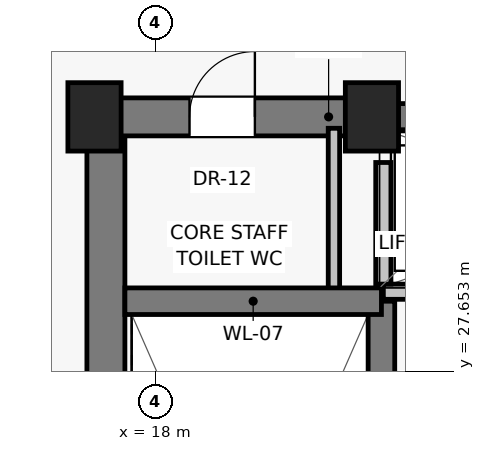
"""IFC4 building model, lengths in metres.
Left out: names, types, materials, properties, quantities, classifications, styles, units other than length and angle.
Written with IfcOpenShell. Run it as: python <this file> out.ifc"""

import sys

from ifc_helpers import new_model, si_unit, direction, frame, frame_2d, origin, origin_2d, place, context, subcontext, project, spatial, rectangle, extrude, source, transform, mapped, element, fill, save


model = new_model("IFC4")
c1 = context("Model", 3, precision=1e-05, world=origin(), true_north=direction((0.0, 1.0)))
c2 = subcontext(c1, "Body", "Model", "MODEL_VIEW")
j1 = project(units=[si_unit("LENGTHUNIT", "METRE"), si_unit("PLANEANGLEUNIT", "RADIAN")], contexts=[c1])
p1 = place(None, origin())
s1 = spatial("IfcSite", under=j1, at=p1, CompositionType="ELEMENT")
p2 = place(p1, origin())
s2 = spatial("IfcBuilding", under=s1, at=p2, CompositionType="ELEMENT")
p3 = place(p2, frame((0.0, 0.0, 182.1)))
s3 = spatial("IfcBuildingStorey", under=s2, at=p3, CompositionType="ELEMENT", Elevation=182.1)
for number, where, z_axis, x_axis in (
    (1, (17.2, 31.0, 0.0), (0.0, 0.0, 1.0), (1.0, 0.0, 0.0)),
    (2, (20.85, 31.0, 0.0), (0.0, 0.0, 1.0), (1.0, 0.0, 0.0)),
):
    element("IfcColumn", number, at=place(p3, frame(where, z_axis=z_axis, x_axis=x_axis)), inside=s3, PredefinedType="PILASTER", context=c2, shape_type="SweptSolid", body=[
        extrude(rectangle(XDim=0.7, YDim=0.9, at=origin_2d()), origin(), (0.0, 0.0, 1.0), 3.25),
    ])
p4 = place(p3, frame((17.35, 16.8, 0.0), z_axis=(0.0, 0.0, 1.0), x_axis=(0.0, 1.0, 0.0)))
e3 = element("IfcWall", 3, at=p4, inside=s3, PredefinedType="SHEAR", context=c2, shape_type="SweptSolid", body=[
    extrude(rectangle(XDim=14.2, YDim=0.5, at=frame_2d((7.1, 0.0))), origin(), (0.0, 0.0, 1.0), 3.015),
])
p5 = place(p3, frame((17.2, 31.0, 0.0), z_axis=(0.0, 0.0, 1.0), x_axis=(1.0, 0.0, 0.0)))
e4 = element("IfcWall", 4, at=p5, inside=s3, PredefinedType="SHEAR", context=c2, shape_type="SweptSolid", body=[
    extrude(rectangle(XDim=3.8, YDim=0.5, at=frame_2d((1.9, 0.0))), origin(), (0.0, 0.0, 1.0), 3.015),
])
p6 = place(p5, frame((1.25, 0.0, 0.0)))
e5 = element("IfcOpeningElement", 5, at=p6, cuts=e4, PredefinedType="OPENING", context=c2, shape_type="SweptSolid", body=[
    extrude(rectangle(XDim=0.86, YDim=2.01, at=frame_2d((0.43, 1.005))), frame((0.0, 0.26, 0.0), z_axis=(0.0, -1.0, 0.0), x_axis=(1.0, 0.0, 0.0)), (0.0, 0.0, 1.0), 0.52),
])
p7 = place(p3, frame((21.0, 31.0, 0.0), z_axis=(0.0, 0.0, 1.0), x_axis=(1.0, 0.0, 0.0)))
e6 = element("IfcWall", 6, at=p7, inside=s3, PredefinedType="SHEAR", context=c2, shape_type="SweptSolid", body=[
    extrude(rectangle(XDim=6.0, YDim=0.35, at=frame_2d((3.0, 0.0))), origin(), (0.0, 0.0, 1.0), 3.015),
])
p8 = place(p7, frame((0.5, 0.0, 0.0)))
e7 = element("IfcOpeningElement", 7, at=p8, cuts=e6, PredefinedType="OPENING", context=c2, shape_type="SweptSolid", body=[
    extrude(rectangle(XDim=1.1, YDim=2.08, at=frame_2d((0.55, 1.04))), frame((0.0, 0.185, 0.0), z_axis=(0.0, -1.0, 0.0), x_axis=(1.0, 0.0, 0.0)), (0.0, 0.0, 1.0), 0.37),
])
p9 = place(p7, frame((2.45, 0.0, 0.0)))
e8 = element("IfcOpeningElement", 8, at=p9, cuts=e6, PredefinedType="OPENING", context=c2, shape_type="SweptSolid", body=[
    extrude(rectangle(XDim=1.1, YDim=2.08, at=frame_2d((0.55, 1.04))), frame((0.0, 0.185, 0.0), z_axis=(0.0, -1.0, 0.0), x_axis=(1.0, 0.0, 0.0)), (0.0, 0.0, 1.0), 0.37),
])
p10 = place(p7, frame((4.4, 0.0, 0.0)))
e9 = element("IfcOpeningElement", 9, at=p10, cuts=e6, PredefinedType="OPENING", context=c2, shape_type="SweptSolid", body=[
    extrude(rectangle(XDim=1.1, YDim=2.08, at=frame_2d((0.55, 1.04))), frame((0.0, 0.185, 0.0), z_axis=(0.0, -1.0, 0.0), x_axis=(1.0, 0.0, 0.0)), (0.0, 0.0, 1.0), 0.37),
])
p11 = place(p3, frame((20.35, 28.65, 0.0), z_axis=(0.0, 0.0, 1.0), x_axis=(0.0, 1.0, 0.0)))
e10 = element("IfcWall", 10, at=p11, inside=s3, PredefinedType="PARTITIONING", context=c2, shape_type="SweptSolid", body=[
    extrude(rectangle(XDim=2.2, YDim=0.15, at=frame_2d((1.1, 0.0))), origin(), (0.0, 0.0, 1.0), 3.015),
])
p12 = place(p3, frame((20.975, 19.8, 0.0), z_axis=(0.0, 0.0, 1.0), x_axis=(0.0, 1.0, 0.0)))
e11 = element("IfcWall", 11, at=p12, inside=s3, PredefinedType="SHEAR", context=c2, shape_type="SweptSolid", body=[
    extrude(rectangle(XDim=8.775, YDim=0.35, at=frame_2d((4.387, 0.0))), origin(), (0.0, 0.0, 1.0), 3.015),
])
p13 = place(p3, frame((17.6, 28.575, 0.0), z_axis=(0.0, 0.0, 1.0), x_axis=(1.0, 0.0, 0.0)))
e12 = element("IfcWall", 12, at=p13, inside=s3, PredefinedType="SHEAR", context=c2, shape_type="SweptSolid", body=[
    extrude(rectangle(XDim=3.375, YDim=0.35, at=frame_2d((1.688, 0.0))), origin(), (0.0, 0.0, 1.0), 3.015),
])
p14 = place(p3, frame((21.0, 28.7, 0.0), z_axis=(0.0, 0.0, 1.0), x_axis=(1.0, 0.0, 0.0)))
e13 = element("IfcWall", 13, at=p14, inside=s3, PredefinedType="SOLIDWALL", context=c2, shape_type="SweptSolid", body=[
    extrude(rectangle(XDim=6.0, YDim=0.2, at=frame_2d((3.0, 0.0))), origin(), (0.0, 0.0, 1.0), 3.015),
])
p15 = place(p3, frame((21.0, 28.8, 0.0), z_axis=(0.0, 0.0, 1.0), x_axis=(0.0, 1.0, 0.0)))
e14 = element("IfcWall", 14, at=p15, inside=s3, PredefinedType="SOLIDWALL", context=c2, shape_type="SweptSolid", body=[
    extrude(rectangle(XDim=1.6, YDim=0.2, at=frame_2d((0.8, 0.0))), origin(), (0.0, 0.0, 1.0), 3.015),
])
m1 = source(origin(), c2, "Body", "SweptSolid", [
    extrude(rectangle(XDim=0.86, YDim=2.01, at=frame_2d((0.43, 1.005))), frame((0.0, 0.025, 0.0), z_axis=(0.0, -1.0, 0.0), x_axis=(1.0, 0.0, 0.0)), (0.0, 0.0, 1.0), 0.05),
])
p16 = place(p6, origin())
e15 = element("IfcDoor", 15, at=p16, inside=s3, OperationType="SINGLE_SWING_RIGHT", PredefinedType="DOOR", context=c2, shape_type="MappedRepresentation", body=[
    mapped(m1, transform((0.0, 0.0, 0.0), scale=1.0)),
])
fill(e5, e15)
save(model, sys.argv[1])
